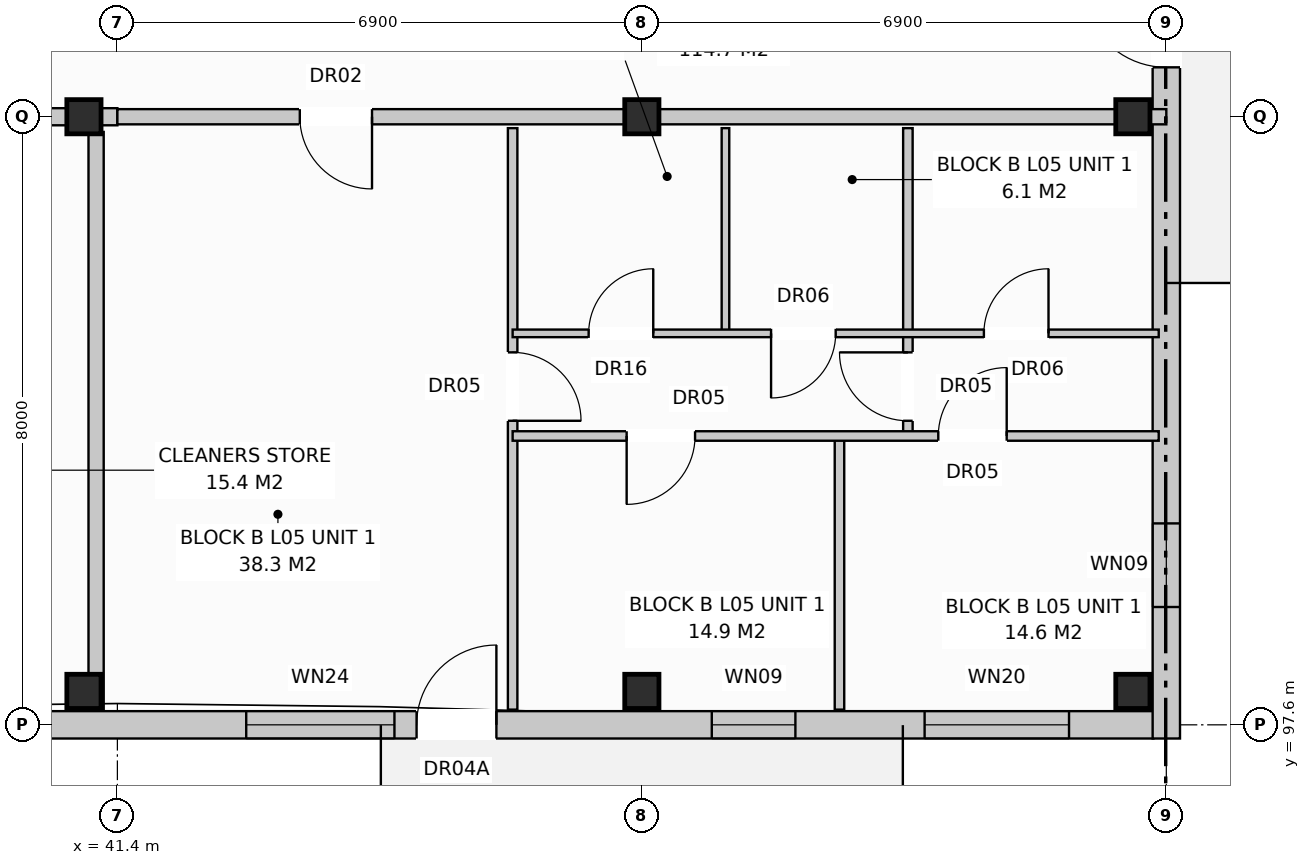
"""IFC4 building model, lengths in metres.
Left out: names, types, materials, properties, quantities, classifications, styles, units other than length and angle.
Written with IfcOpenShell. Run it as: python <this file> out.ifc"""

import sys

from ifc_helpers import new_model, si_unit, direction, frame, frame_2d, origin, origin_with_axes, origin_2d, place, context, subcontext, project, spatial, rectangle, extrude, element, fill, save


model = new_model("IFC4")
c1 = context("Model", 3, precision=1e-05, world=origin(), true_north=direction((0.0, 1.0)))
c2 = subcontext(c1, "Body", "Model", "MODEL_VIEW")
j1 = project(units=[si_unit("LENGTHUNIT", "METRE"), si_unit("PLANEANGLEUNIT", "RADIAN")], contexts=[c1])
p1 = place(None, origin())
s1 = spatial("IfcSite", under=j1, at=p1, CompositionType="ELEMENT")
p2 = place(p1, origin())
s2 = spatial("IfcBuilding", under=s1, at=p2, CompositionType="ELEMENT")
p3 = place(p2, frame((0.0, 0.0, 17.6)))
s3 = spatial("IfcBuildingStorey", under=s2, at=p3, CompositionType="ELEMENT", Elevation=17.6)
for number, where, z_axis, x_axis in (
    (1, (40.96, 98.04, 0.0), (0.0, 0.0, 1.0), (1.0, 0.0, 0.0)),
    (2, (40.96, 105.6, 0.0), (0.0, 0.0, 1.0), (1.0, 0.0, 0.0)),
    (3, (48.3, 98.04, 0.0), (0.0, 0.0, 1.0), (1.0, 0.0, 0.0)),
    (4, (48.3, 105.6, 0.0), (0.0, 0.0, 1.0), (1.0, 0.0, 0.0)),
    (5, (54.76, 98.04, 0.0), (0.0, 0.0, 1.0), (1.0, 0.0, 0.0)),
    (6, (54.76, 105.6, 0.0), (0.0, 0.0, 1.0), (1.0, 0.0, 0.0)),
):
    element("IfcColumn", number, at=place(p3, frame(where, z_axis=z_axis, x_axis=x_axis)), inside=s3, PredefinedType="COLUMN", context=c2, shape_type="SweptSolid", body=[
        extrude(rectangle(XDim=0.45, YDim=0.45, at=origin_2d()), origin(), (0.0, 0.0, 1.0), 3.2),
    ])
p4 = place(p3, frame((31.35, 97.6, 0.0), z_axis=(0.0, 0.0, 1.0), x_axis=(1.0, 0.0, 0.0)))
e7 = element("IfcWall", 7, at=p4, inside=s3, PredefinedType="STANDARD", context=c2, shape_type="SweptSolid", body=[
    extrude(rectangle(XDim=23.68, YDim=0.36, at=frame_2d((11.84, 0.0))), origin(), (0.0, 0.0, 1.0), 2.95),
])
p5 = place(p4, frame((13.986, 0.0, 0.0)))
e8 = element("IfcOpeningElement", 8, at=p5, cuts=e7, PredefinedType="OPENING", context=c2, shape_type="SweptSolid", body=[
    extrude(rectangle(XDim=1.05, YDim=2.12, at=frame_2d((0.525, 1.06))), frame((0.0, 0.192, 0.0), z_axis=(0.0, -1.0, 0.0), x_axis=(1.0, 0.0, 0.0)), (0.0, 0.0, 1.0), 0.384),
])
p6 = place(p4, frame((11.745, 0.0, 0.8)))
e9 = element("IfcOpeningElement", 9, at=p6, cuts=e7, PredefinedType="OPENING", context=c2, shape_type="SweptSolid", body=[
    extrude(rectangle(XDim=1.95, YDim=1.65, at=frame_2d((0.975, 0.825))), frame((0.0, 0.192, 0.0), z_axis=(0.0, -1.0, 0.0), x_axis=(1.0, 0.0, 0.0)), (0.0, 0.0, 1.0), 0.384),
])
p7 = place(p4, frame((17.87, 0.0, 0.72)))
e10 = element("IfcOpeningElement", 10, at=p7, cuts=e7, PredefinedType="OPENING", context=c2, shape_type="SweptSolid", body=[
    extrude(rectangle(XDim=1.1, YDim=1.5, at=frame_2d((0.55, 0.75))), frame((0.0, 0.192, 0.0), z_axis=(0.0, -1.0, 0.0), x_axis=(1.0, 0.0, 0.0)), (0.0, 0.0, 1.0), 0.384),
])
p8 = place(p4, frame((20.67, 0.0, 0.8)))
e11 = element("IfcOpeningElement", 11, at=p8, cuts=e7, PredefinedType="OPENING", context=c2, shape_type="SweptSolid", body=[
    extrude(rectangle(XDim=1.9, YDim=1.85, at=frame_2d((0.95, 0.925))), frame((0.0, 0.192, 0.0), z_axis=(0.0, -1.0, 0.0), x_axis=(1.0, 0.0, 0.0)), (0.0, 0.0, 1.0), 0.384),
])
p9 = place(p3, frame((55.2, 97.42, 0.0), z_axis=(0.0, 0.0, 1.0), x_axis=(0.0, 1.0, 0.0)))
e12 = element("IfcWall", 12, at=p9, inside=s3, PredefinedType="STANDARD", context=c2, shape_type="SweptSolid", body=[
    extrude(rectangle(XDim=18.76, YDim=0.36, at=frame_2d((9.38, 0.0))), origin(), (0.0, 0.0, 1.0), 2.95),
])
p10 = place(p9, frame((8.83, 0.0, 0.0)))
e13 = element("IfcOpeningElement", 13, at=p10, cuts=e12, PredefinedType="OPENING", context=c2, shape_type="SweptSolid", body=[
    extrude(rectangle(XDim=1.1, YDim=2.1, at=frame_2d((0.55, 1.05))), frame((0.0, 0.192, 0.0), z_axis=(0.0, -1.0, 0.0), x_axis=(1.0, 0.0, 0.0)), (0.0, 0.0, 1.0), 0.384),
])
p11 = place(p9, frame((1.73, 0.0, 0.72)))
e14 = element("IfcOpeningElement", 14, at=p11, cuts=e12, PredefinedType="OPENING", context=c2, shape_type="SweptSolid", body=[
    extrude(rectangle(XDim=1.1, YDim=1.5, at=frame_2d((0.55, 0.75))), frame((0.0, 0.192, 0.0), z_axis=(0.0, -1.0, 0.0), x_axis=(1.0, 0.0, 0.0)), (0.0, 0.0, 1.0), 0.384),
])
p12 = place(p9, frame((15.93, 0.0, 0.72)))
e15 = element("IfcOpeningElement", 15, at=p12, cuts=e12, PredefinedType="OPENING", context=c2, shape_type="SweptSolid", body=[
    extrude(rectangle(XDim=1.1, YDim=1.5, at=frame_2d((0.55, 0.75))), frame((0.0, 0.192, 0.0), z_axis=(0.0, -1.0, 0.0), x_axis=(1.0, 0.0, 0.0)), (0.0, 0.0, 1.0), 0.384),
])
p13 = place(p3, frame((41.12, 97.8, 0.0), z_axis=(0.0, 0.0, 1.0), x_axis=(0.0, 1.0, 0.0)))
e16 = element("IfcWall", 16, at=p13, inside=s3, PredefinedType="PARTITIONING", context=c2, shape_type="SweptSolid", body=[
    extrude(rectangle(XDim=7.6, YDim=0.2, at=frame_2d((3.8, 0.0))), origin(), (0.0, 0.0, 1.0), 2.95),
])
p14 = place(p3, frame((31.5, 105.6, 0.0), z_axis=(0.0, 0.0, 1.0), x_axis=(1.0, 0.0, 0.0)))
e17 = element("IfcWall", 17, at=p14, inside=s3, PredefinedType="PARTITIONING", context=c2, shape_type="SweptSolid", body=[
    extrude(rectangle(XDim=9.9, YDim=0.225, at=frame_2d((4.95, 0.0))), origin(), (0.0, 0.0, 1.0), 2.39),
])
p15 = place(p14, frame((0.475, 0.0, 0.0)))
e18 = element("IfcOpeningElement", 18, at=p15, cuts=e17, PredefinedType="OPENING", context=c2, shape_type="SweptSolid", body=[
    extrude(rectangle(XDim=1.1, YDim=2.15, at=frame_2d((0.55, 1.075))), frame((0.0, 0.125, 0.0), z_axis=(0.0, -1.0, 0.0), x_axis=(1.0, 0.0, 0.0)), (0.0, 0.0, 1.0), 0.249),
])
p16 = place(p14, frame((5.75, 0.0, 0.0)))
e19 = element("IfcOpeningElement", 19, at=p16, cuts=e17, PredefinedType="OPENING", context=c2, shape_type="SweptSolid", body=[
    extrude(rectangle(XDim=0.9, YDim=2.1, at=frame_2d((0.45, 1.05))), frame((0.0, 0.125, 0.0), z_axis=(0.0, -1.0, 0.0), x_axis=(1.0, 0.0, 0.0)), (0.0, 0.0, 1.0), 0.249),
])
p17 = place(p14, frame((7.8, 0.0, 0.0)))
e20 = element("IfcOpeningElement", 20, at=p17, cuts=e17, PredefinedType="OPENING", context=c2, shape_type="SweptSolid", body=[
    extrude(rectangle(XDim=0.95, YDim=2.15, at=frame_2d((0.475, 1.075))), frame((0.0, 0.125, 0.0), z_axis=(0.0, -1.0, 0.0), x_axis=(1.0, 0.0, 0.0)), (0.0, 0.0, 1.0), 0.249),
])
p18 = place(p3, frame((41.4, 105.6, 0.0), z_axis=(0.0, 0.0, 1.0), x_axis=(1.0, 0.0, 0.0)))
e21 = element("IfcWall", 21, at=p18, inside=s3, PredefinedType="PARTITIONING", context=c2, shape_type="SweptSolid", body=[
    extrude(rectangle(XDim=13.8, YDim=0.2, at=frame_2d((6.9, 0.0))), origin(), (0.0, 0.0, 1.0), 2.39),
])
p19 = place(p18, frame((2.4, 0.0, 0.0)))
e22 = element("IfcOpeningElement", 22, at=p19, cuts=e21, PredefinedType="OPENING", context=c2, shape_type="SweptSolid", body=[
    extrude(rectangle(XDim=0.95, YDim=2.15, at=frame_2d((0.475, 1.075))), frame((0.0, 0.112, 0.0), z_axis=(0.0, -1.0, 0.0), x_axis=(1.0, 0.0, 0.0)), (0.0, 0.0, 1.0), 0.224),
])
p20 = place(p3, frame((46.6, 105.45, 0.0), z_axis=(0.0, 0.0, 1.0), x_axis=(0.0, -1.0, 0.0)))
e23 = element("IfcWall", 23, at=p20, inside=s3, PredefinedType="PARTITIONING", context=c2, shape_type="SweptSolid", body=[
    extrude(rectangle(XDim=7.65, YDim=0.125, at=frame_2d((3.825, 0.0))), origin(), (0.0, 0.0, 1.0), 2.95),
])
p21 = place(p20, frame((2.95, 0.0, 0.0)))
e24 = element("IfcOpeningElement", 24, at=p21, cuts=e23, PredefinedType="OPENING", context=c2, shape_type="SweptSolid", body=[
    extrude(rectangle(XDim=0.9, YDim=2.1, at=frame_2d((0.45, 1.05))), frame((0.0, 0.074, 0.0), z_axis=(0.0, -1.0, 0.0), x_axis=(1.0, 0.0, 0.0)), (0.0, 0.0, 1.0), 0.149),
])
p22 = place(p3, frame((49.4, 105.45, 0.0), z_axis=(0.0, 0.0, 1.0), x_axis=(0.0, -1.0, 0.0)))
e25 = element("IfcWall", 25, at=p22, inside=s3, PredefinedType="PARTITIONING", context=c2, shape_type="SweptSolid", body=[
    extrude(rectangle(XDim=2.7, YDim=0.1, at=frame_2d((1.35, 0.0))), origin(), (0.0, 0.0, 1.0), 2.95),
])
p23 = place(p3, frame((51.8, 105.45, 0.0), z_axis=(0.0, 0.0, 1.0), x_axis=(0.0, -1.0, 0.0)))
e26 = element("IfcWall", 26, at=p23, inside=s3, PredefinedType="PARTITIONING", context=c2, shape_type="SweptSolid", body=[
    extrude(rectangle(XDim=4.05, YDim=0.125, at=frame_2d((2.025, 0.0))), origin(), (0.0, 0.0, 1.0), 2.95),
])
p24 = place(p23, frame((2.95, 0.0, 0.0)))
e27 = element("IfcOpeningElement", 27, at=p24, cuts=e26, PredefinedType="OPENING", context=c2, shape_type="SweptSolid", body=[
    extrude(rectangle(XDim=0.9, YDim=2.1, at=frame_2d((0.45, 1.05))), frame((0.0, 0.074, 0.0), z_axis=(0.0, -1.0, 0.0), x_axis=(1.0, 0.0, 0.0)), (0.0, 0.0, 1.0), 0.149),
])
p25 = place(p3, frame((50.9, 101.4, 0.0), z_axis=(0.0, 0.0, 1.0), x_axis=(0.0, -1.0, 0.0)))
e28 = element("IfcWall", 28, at=p25, inside=s3, PredefinedType="PARTITIONING", context=c2, shape_type="SweptSolid", body=[
    extrude(rectangle(XDim=3.6, YDim=0.125, at=frame_2d((1.8, 0.0))), origin(), (0.0, 0.0, 1.0), 2.59),
])
p26 = place(p3, frame((46.6, 102.75, 0.0), z_axis=(0.0, 0.0, 1.0), x_axis=(1.0, 0.0, 0.0)))
e29 = element("IfcWall", 29, at=p26, inside=s3, PredefinedType="PARTITIONING", context=c2, shape_type="SweptSolid", body=[
    extrude(rectangle(XDim=8.5, YDim=0.1, at=frame_2d((4.25, 0.0))), origin(), (0.0, 0.0, 1.0), 2.95),
])
p27 = place(p26, frame((1.0, 0.0, 0.0)))
e30 = element("IfcOpeningElement", 30, at=p27, cuts=e29, PredefinedType="OPENING", context=c2, shape_type="SweptSolid", body=[
    extrude(rectangle(XDim=0.85, YDim=2.1, at=frame_2d((0.425, 1.05))), frame((0.0, 0.062, 0.0), z_axis=(0.0, -1.0, 0.0), x_axis=(1.0, 0.0, 0.0)), (0.0, 0.0, 1.0), 0.124),
])
p28 = place(p26, frame((3.4, 0.0, 0.0)))
e31 = element("IfcOpeningElement", 31, at=p28, cuts=e29, PredefinedType="OPENING", context=c2, shape_type="SweptSolid", body=[
    extrude(rectangle(XDim=0.85, YDim=2.05, at=frame_2d((0.425, 1.025))), frame((0.0, 0.062, 0.0), z_axis=(0.0, -1.0, 0.0), x_axis=(1.0, 0.0, 0.0)), (0.0, 0.0, 1.0), 0.124),
])
p29 = place(p26, frame((6.2, 0.0, 0.0)))
e32 = element("IfcOpeningElement", 32, at=p29, cuts=e29, PredefinedType="OPENING", context=c2, shape_type="SweptSolid", body=[
    extrude(rectangle(XDim=0.85, YDim=2.05, at=frame_2d((0.425, 1.025))), frame((0.0, 0.062, 0.0), z_axis=(0.0, -1.0, 0.0), x_axis=(1.0, 0.0, 0.0)), (0.0, 0.0, 1.0), 0.124),
])
p30 = place(p3, frame((46.6, 101.4, 0.0), z_axis=(0.0, 0.0, 1.0), x_axis=(1.0, 0.0, 0.0)))
e33 = element("IfcWall", 33, at=p30, inside=s3, PredefinedType="PARTITIONING", context=c2, shape_type="SweptSolid", body=[
    extrude(rectangle(XDim=8.5, YDim=0.125, at=frame_2d((4.25, 0.0))), origin(), (0.0, 0.0, 1.0), 2.95),
])
p31 = place(p30, frame((1.5, 0.0, 0.0)))
e34 = element("IfcOpeningElement", 34, at=p31, cuts=e33, PredefinedType="OPENING", context=c2, shape_type="SweptSolid", body=[
    extrude(rectangle(XDim=0.9, YDim=2.1, at=frame_2d((0.45, 1.05))), frame((0.0, 0.074, 0.0), z_axis=(0.0, -1.0, 0.0), x_axis=(1.0, 0.0, 0.0)), (0.0, 0.0, 1.0), 0.149),
])
p32 = place(p30, frame((5.6, 0.0, 0.0)))
e35 = element("IfcOpeningElement", 35, at=p32, cuts=e33, PredefinedType="OPENING", context=c2, shape_type="SweptSolid", body=[
    extrude(rectangle(XDim=0.9, YDim=2.1, at=frame_2d((0.45, 1.05))), frame((0.0, 0.074, 0.0), z_axis=(0.0, -1.0, 0.0), x_axis=(1.0, 0.0, 0.0)), (0.0, 0.0, 1.0), 0.149),
])
p33 = place(p5, origin_with_axes())
e36 = element("IfcDoor", 36, at=p33, inside=s3, OperationType="SINGLE_SWING_RIGHT", PredefinedType="DOOR", context=c2, shape_type="SweptSolid", body=[
    extrude(rectangle(XDim=1.05, YDim=2.12, at=frame_2d((0.525, 1.06))), frame((0.0, 0.025, 0.0), z_axis=(0.0, -1.0, 0.0), x_axis=(1.0, 0.0, 0.0)), (0.0, 0.0, 1.0), 0.05),
])
fill(e8, e36)
p34 = place(p6, origin_with_axes())
e37 = element("IfcWindow", 37, at=p34, inside=s3, PartitioningType="SINGLE_PANEL", PredefinedType="WINDOW", context=c2, shape_type="SweptSolid", body=[
    extrude(rectangle(XDim=1.95, YDim=1.65, at=frame_2d((0.975, 0.825))), frame((0.0, 0.03, 0.0), z_axis=(0.0, -1.0, 0.0), x_axis=(1.0, 0.0, 0.0)), (0.0, 0.0, 1.0), 0.06),
])
fill(e9, e37)
p35 = place(p7, origin_with_axes())
e38 = element("IfcWindow", 38, at=p35, inside=s3, PartitioningType="SINGLE_PANEL", PredefinedType="WINDOW", context=c2, shape_type="SweptSolid", body=[
    extrude(rectangle(XDim=1.1, YDim=1.5, at=frame_2d((0.55, 0.75))), frame((0.0, 0.03, 0.0), z_axis=(0.0, -1.0, 0.0), x_axis=(1.0, 0.0, 0.0)), (0.0, 0.0, 1.0), 0.06),
])
fill(e10, e38)
p36 = place(p8, origin_with_axes())
e39 = element("IfcWindow", 39, at=p36, inside=s3, PartitioningType="SINGLE_PANEL", PredefinedType="WINDOW", context=c2, shape_type="SweptSolid", body=[
    extrude(rectangle(XDim=1.9, YDim=1.85, at=frame_2d((0.95, 0.925))), frame((0.0, 0.03, 0.0), z_axis=(0.0, -1.0, 0.0), x_axis=(1.0, 0.0, 0.0)), (0.0, 0.0, 1.0), 0.06),
])
fill(e11, e39)
p37 = place(p10, origin_with_axes())
e40 = element("IfcDoor", 40, at=p37, inside=s3, OperationType="SINGLE_SWING_RIGHT", PredefinedType="DOOR", context=c2, shape_type="SweptSolid", body=[
    extrude(rectangle(XDim=1.1, YDim=2.1, at=frame_2d((0.55, 1.05))), frame((0.0, 0.025, 0.0), z_axis=(0.0, -1.0, 0.0), x_axis=(1.0, 0.0, 0.0)), (0.0, 0.0, 1.0), 0.05),
])
fill(e13, e40)
p38 = place(p11, origin_with_axes())
e41 = element("IfcWindow", 41, at=p38, inside=s3, PartitioningType="SINGLE_PANEL", PredefinedType="WINDOW", context=c2, shape_type="SweptSolid", body=[
    extrude(rectangle(XDim=1.1, YDim=1.5, at=frame_2d((0.55, 0.75))), frame((0.0, 0.03, 0.0), z_axis=(0.0, -1.0, 0.0), x_axis=(1.0, 0.0, 0.0)), (0.0, 0.0, 1.0), 0.06),
])
fill(e14, e41)
p39 = place(p19, frame((0.95, 0.0, 0.0), z_axis=(0.0, 0.0, 1.0), x_axis=(-1.0, 0.0, 0.0)))
e42 = element("IfcDoor", 42, at=p39, inside=s3, OperationType="SINGLE_SWING_RIGHT", PredefinedType="DOOR", context=c2, shape_type="SweptSolid", body=[
    extrude(rectangle(XDim=0.95, YDim=2.15, at=frame_2d((0.475, 1.075))), frame((0.0, 0.025, 0.0), z_axis=(0.0, -1.0, 0.0), x_axis=(1.0, 0.0, 0.0)), (0.0, 0.0, 1.0), 0.05),
])
fill(e22, e42)
p40 = place(p21, origin_with_axes())
e43 = element("IfcDoor", 43, at=p40, inside=s3, OperationType="SINGLE_SWING_RIGHT", PredefinedType="DOOR", context=c2, shape_type="SweptSolid", body=[
    extrude(rectangle(XDim=0.9, YDim=2.1, at=frame_2d((0.45, 1.05))), frame((0.0, 0.025, 0.0), z_axis=(0.0, -1.0, 0.0), x_axis=(1.0, 0.0, 0.0)), (0.0, 0.0, 1.0), 0.05),
])
fill(e24, e43)
p41 = place(p24, frame((0.9, 0.0, 0.0), z_axis=(0.0, 0.0, 1.0), x_axis=(-1.0, 0.0, 0.0)))
e44 = element("IfcDoor", 44, at=p41, inside=s3, OperationType="SINGLE_SWING_LEFT", PredefinedType="DOOR", context=c2, shape_type="SweptSolid", body=[
    extrude(rectangle(XDim=0.9, YDim=2.1, at=frame_2d((0.45, 1.05))), frame((0.0, 0.025, 0.0), z_axis=(0.0, -1.0, 0.0), x_axis=(1.0, 0.0, 0.0)), (0.0, 0.0, 1.0), 0.05),
])
fill(e27, e44)
p42 = place(p27, origin_with_axes())
e45 = element("IfcDoor", 45, at=p42, inside=s3, OperationType="SINGLE_SWING_RIGHT", PredefinedType="DOOR", context=c2, shape_type="SweptSolid", body=[
    extrude(rectangle(XDim=0.85, YDim=2.1, at=frame_2d((0.425, 1.05))), frame((0.0, 0.025, 0.0), z_axis=(0.0, -1.0, 0.0), x_axis=(1.0, 0.0, 0.0)), (0.0, 0.0, 1.0), 0.05),
])
fill(e30, e45)
p43 = place(p28, frame((0.85, 0.0, 0.0), z_axis=(0.0, 0.0, 1.0), x_axis=(-1.0, 0.0, 0.0)))
e46 = element("IfcDoor", 46, at=p43, inside=s3, OperationType="SINGLE_SWING_LEFT", PredefinedType="DOOR", context=c2, shape_type="SweptSolid", body=[
    extrude(rectangle(XDim=0.85, YDim=2.05, at=frame_2d((0.425, 1.025))), frame((0.0, 0.025, 0.0), z_axis=(0.0, -1.0, 0.0), x_axis=(1.0, 0.0, 0.0)), (0.0, 0.0, 1.0), 0.05),
])
fill(e31, e46)
p44 = place(p29, origin_with_axes())
e47 = element("IfcDoor", 47, at=p44, inside=s3, OperationType="SINGLE_SWING_RIGHT", PredefinedType="DOOR", context=c2, shape_type="SweptSolid", body=[
    extrude(rectangle(XDim=0.85, YDim=2.05, at=frame_2d((0.425, 1.025))), frame((0.0, 0.025, 0.0), z_axis=(0.0, -1.0, 0.0), x_axis=(1.0, 0.0, 0.0)), (0.0, 0.0, 1.0), 0.05),
])
fill(e32, e47)
p45 = place(p31, frame((0.9, 0.0, 0.0), z_axis=(0.0, 0.0, 1.0), x_axis=(-1.0, 0.0, 0.0)))
e48 = element("IfcDoor", 48, at=p45, inside=s3, OperationType="SINGLE_SWING_LEFT", PredefinedType="DOOR", context=c2, shape_type="SweptSolid", body=[
    extrude(rectangle(XDim=0.9, YDim=2.1, at=frame_2d((0.45, 1.05))), frame((0.0, 0.025, 0.0), z_axis=(0.0, -1.0, 0.0), x_axis=(1.0, 0.0, 0.0)), (0.0, 0.0, 1.0), 0.05),
])
fill(e34, e48)
p46 = place(p32, origin_with_axes())
e49 = element("IfcDoor", 49, at=p46, inside=s3, OperationType="SINGLE_SWING_RIGHT", PredefinedType="DOOR", context=c2, shape_type="SweptSolid", body=[
    extrude(rectangle(XDim=0.9, YDim=2.1, at=frame_2d((0.45, 1.05))), frame((0.0, 0.025, 0.0), z_axis=(0.0, -1.0, 0.0), x_axis=(1.0, 0.0, 0.0)), (0.0, 0.0, 1.0), 0.05),
])
fill(e35, e49)
save(model, sys.argv[1])
